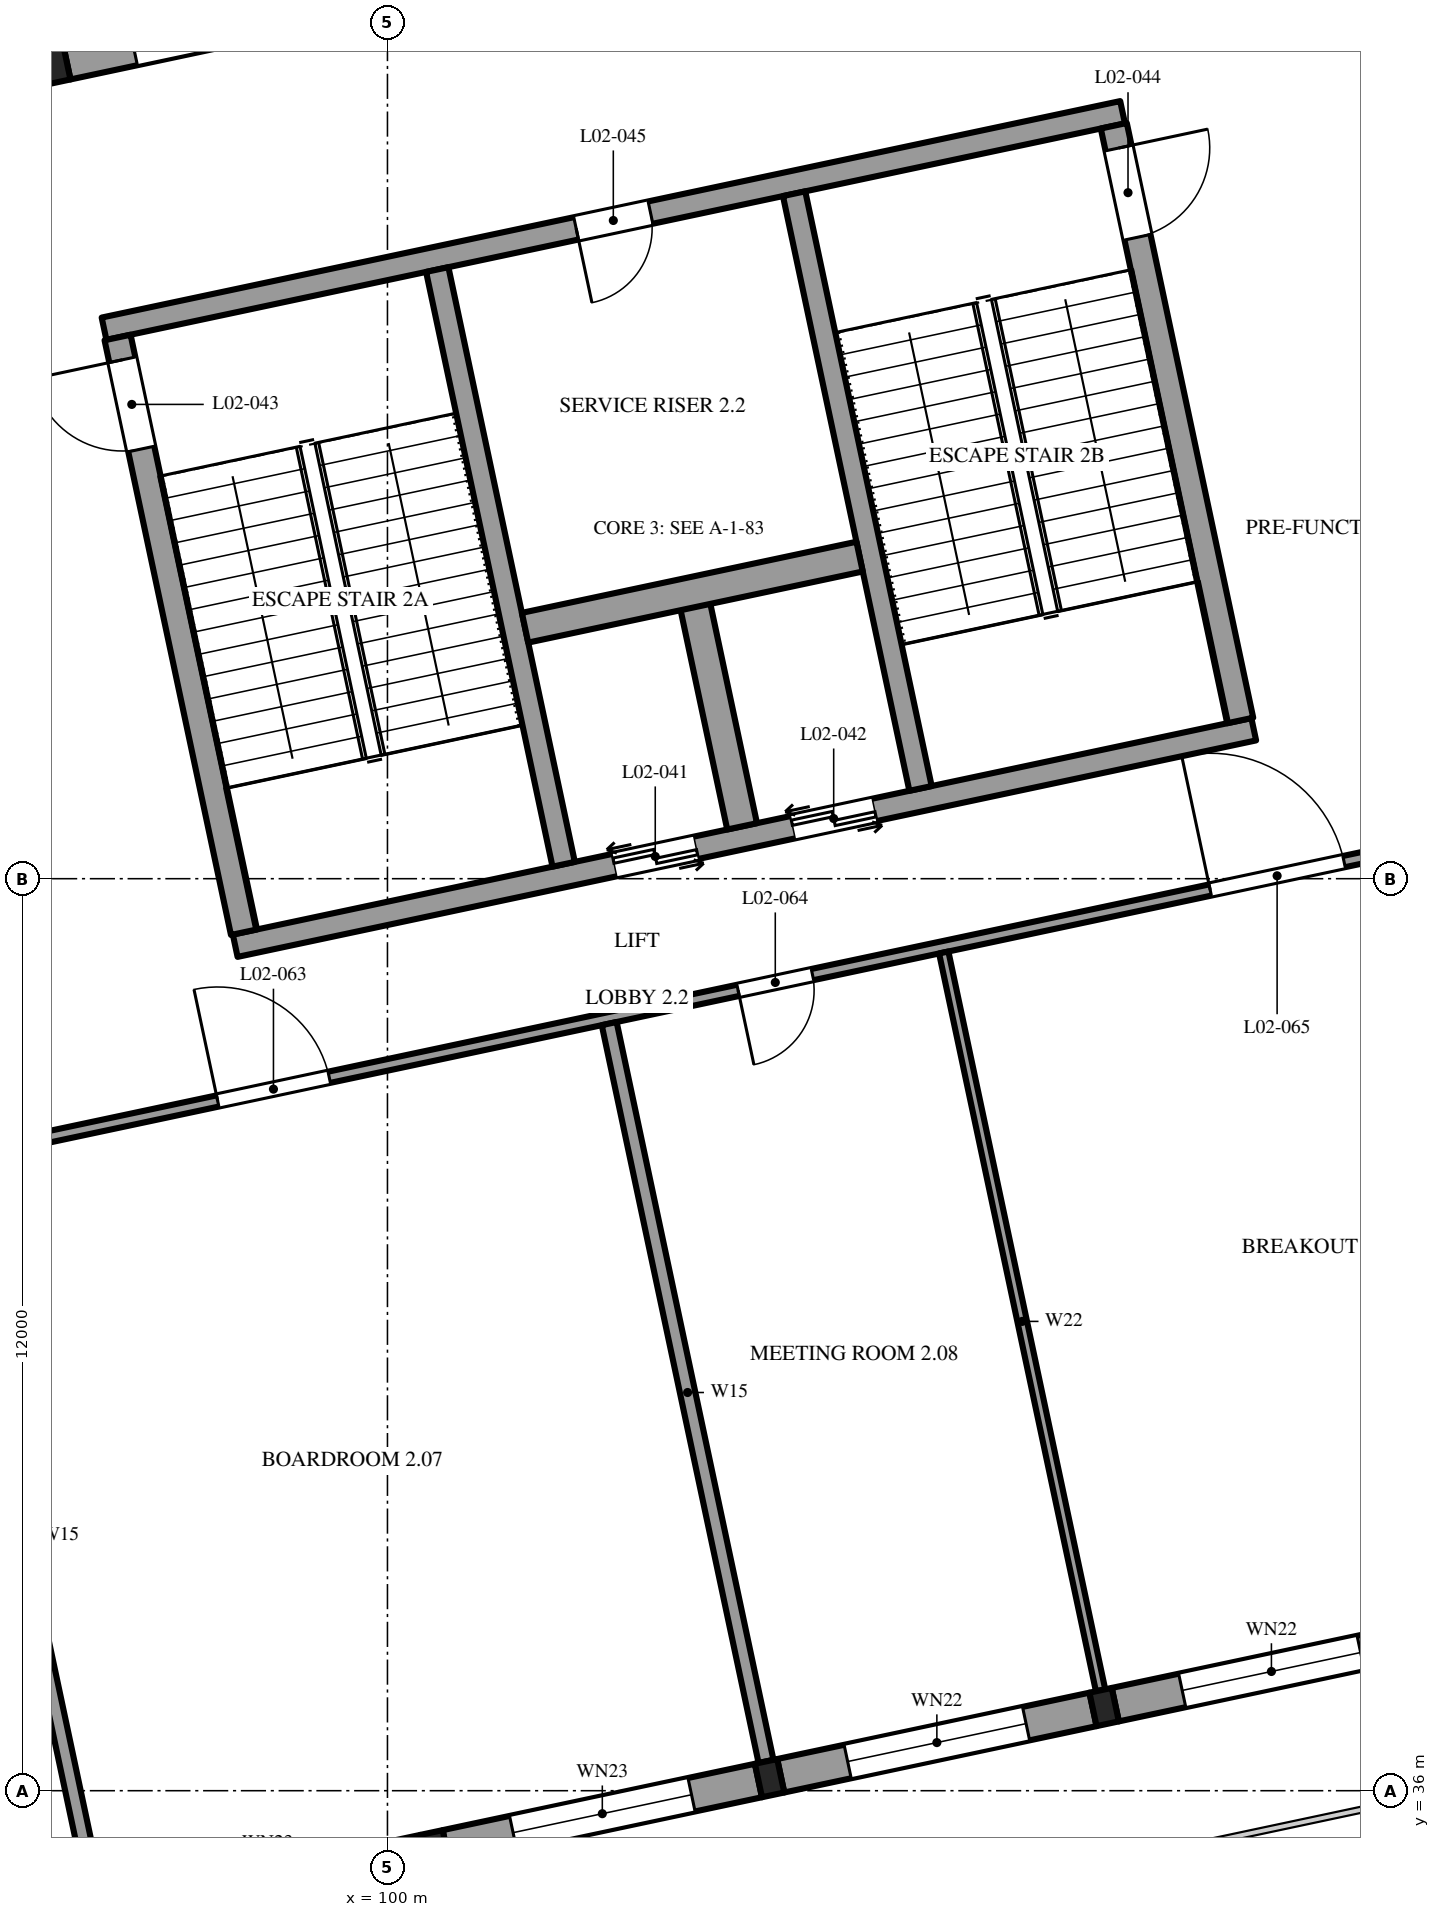
"""IFC4 building model, lengths in metres.
Left out: names, types, materials, properties, quantities, classifications, styles, units other than length and angle.
Written with IfcOpenShell. Run it as: python <this file> out.ifc"""

import sys

from ifc_helpers import new_model, si_unit, direction, frame, frame_2d, origin, origin_2d, place, context, subcontext, project, spatial, rectangle, i_section, extrude, element, fill, save


model = new_model("IFC4")
c1 = context("Model", 3, precision=1e-05, world=origin(), true_north=direction((0.0, 1.0)))
c2 = subcontext(c1, "Body", "Model", "MODEL_VIEW")
j1 = project(units=[si_unit("LENGTHUNIT", "METRE"), si_unit("PLANEANGLEUNIT", "RADIAN")], contexts=[c1])
p1 = place(None, origin())
s1 = spatial("IfcSite", under=j1, at=p1, CompositionType="ELEMENT")
p2 = place(p1, origin())
s2 = spatial("IfcBuilding", under=s1, at=p2, CompositionType="ELEMENT")
p3 = place(p2, frame((0.0, 0.0, 12.0)))
s3 = spatial("IfcBuildingStorey", under=s2, at=p3, CompositionType="ELEMENT", Elevation=12.0)
for number, where, z_axis, x_axis in (
    (1, (100.626, 35.23, 0.0), (0.0, 0.0, 1.0), (0.978, 0.208, 0.0)),
    (2, (105.028, 36.165, 0.0), (0.0, 0.0, 1.0), (0.978, 0.208, 0.0)),
    (3, (109.429, 37.101, 0.0), (0.0, 0.0, 1.0), (0.978, 0.208, 0.0)),
    (4, (95.636, 58.705, 0.0), (0.0, 0.0, 1.0), (0.978, 0.208, 0.0)),
):
    element("IfcColumn", number, at=place(p3, frame(where, z_axis=z_axis, x_axis=x_axis)), inside=s3, PredefinedType="COLUMN", context=c2, shape_type="SweptSolid", body=[
        extrude(i_section(OverallWidth=0.3, OverallDepth=0.45, WebThickness=0.014, FlangeThickness=0.026, FilletRadius=0.027, at=origin_2d()), origin(), (0.0, 0.0, 1.0), 4.8),
    ])
p4 = place(p3, frame((96.271, 55.236, 0.0), z_axis=(0.0, 0.0, 1.0), x_axis=(0.978147662755, 0.20791139903, 0.0)))
e5 = element("IfcWall", 5, at=p4, inside=s3, PredefinedType="SHEAR", context=c2, shape_type="SweptSolid", body=[
    extrude(rectangle(XDim=13.7, YDim=0.3, at=frame_2d((6.85, 0.0))), origin(), (0.0, 0.0, 1.0), 4.8),
])
p5 = place(p4, frame((6.35, 0.0, 0.0)))
e6 = element("IfcOpeningElement", 6, at=p5, cuts=e5, PredefinedType="OPENING", context=c2, shape_type="SweptSolid", body=[
    extrude(rectangle(XDim=1.0, YDim=2.1, at=frame_2d((0.5, 1.05))), frame((0.0, 0.16, 0.0), z_axis=(0.0, -1.0, 0.0), x_axis=(1.0, 0.0, 0.0)), (0.0, 0.0, 1.0), 0.32),
])
p6 = place(p3, frame((97.997, 47.118, 0.0), z_axis=(0.0, 0.0, 1.0), x_axis=(0.978147662755, 0.20791139903, 0.0)))
e7 = element("IfcWall", 7, at=p6, inside=s3, PredefinedType="SHEAR", context=c2, shape_type="SweptSolid", body=[
    extrude(rectangle(XDim=13.7, YDim=0.3, at=frame_2d((6.85, 0.0))), origin(), (0.0, 0.0, 1.0), 4.8),
])
p7 = place(p6, frame((5.1, 0.0, 0.0)))
e8 = element("IfcOpeningElement", 8, at=p7, cuts=e7, PredefinedType="OPENING", context=c2, shape_type="SweptSolid", body=[
    extrude(rectangle(XDim=1.1, YDim=2.1, at=frame_2d((0.55, 1.05))), frame((0.0, 0.16, 0.0), z_axis=(0.0, -1.0, 0.0), x_axis=(1.0, 0.0, 0.0)), (0.0, 0.0, 1.0), 0.32),
])
p8 = place(p6, frame((7.5, 0.0, 0.0)))
e9 = element("IfcOpeningElement", 9, at=p8, cuts=e7, PredefinedType="OPENING", context=c2, shape_type="SweptSolid", body=[
    extrude(rectangle(XDim=1.1, YDim=2.1, at=frame_2d((0.55, 1.05))), frame((0.0, 0.16, 0.0), z_axis=(0.0, -1.0, 0.0), x_axis=(1.0, 0.0, 0.0)), (0.0, 0.0, 1.0), 0.32),
])
p9 = place(p3, frame((96.449, 55.121, 0.0), z_axis=(0.0, 0.0, 1.0), x_axis=(0.207915693476, -0.978146749934, 0.0)))
e10 = element("IfcWall", 10, at=p9, inside=s3, PredefinedType="SOLIDWALL", context=c2, shape_type="SweptSolid", body=[
    extrude(rectangle(XDim=8.0, YDim=0.35, at=frame_2d((4.0, 0.0))), origin(), (0.0, 0.0, 1.0), 4.8),
])
p10 = place(p9, frame((0.3, 0.0, 0.0)))
e11 = element("IfcOpeningElement", 11, at=p10, cuts=e10, PredefinedType="OPENING", context=c2, shape_type="SweptSolid", body=[
    extrude(rectangle(XDim=1.2, YDim=2.1, at=frame_2d((0.6, 1.05))), frame((0.0, 0.185, 0.0), z_axis=(0.0, -1.0, 0.0), x_axis=(1.0, 0.0, 0.0)), (0.0, 0.0, 1.0), 0.37),
])
p11 = place(p3, frame((109.556, 57.907, 0.0), z_axis=(0.0, 0.0, 1.0), x_axis=(0.207915693476, -0.978146749934, 0.0)))
e12 = element("IfcWall", 12, at=p11, inside=s3, PredefinedType="SOLIDWALL", context=c2, shape_type="SweptSolid", body=[
    extrude(rectangle(XDim=8.0, YDim=0.35, at=frame_2d((4.0, 0.0))), origin(), (0.0, 0.0, 1.0), 4.8),
])
p12 = place(p11, frame((0.3, 0.0, 0.0)))
e13 = element("IfcOpeningElement", 13, at=p12, cuts=e12, PredefinedType="OPENING", context=c2, shape_type="SweptSolid", body=[
    extrude(rectangle(XDim=1.2, YDim=2.1, at=frame_2d((0.6, 1.05))), frame((0.0, 0.185, 0.0), z_axis=(0.0, -1.0, 0.0), x_axis=(1.0, 0.0, 0.0)), (0.0, 0.0, 1.0), 0.37),
])
for number, where, z_axis, x_axis in (
    (14, (100.655, 56.015, 0.0), (0.0, 0.0, 1.0), (0.208, -0.978, 0.0)),
    (15, (105.35, 57.013, 0.0), (0.0, 0.0, 1.0), (0.208, -0.978, 0.0)),
):
    element("IfcWall", number, at=place(p3, frame(where, z_axis=z_axis, x_axis=x_axis)), inside=s3, PredefinedType="SHEAR", context=c2, shape_type="SweptSolid", body=[
        extrude(rectangle(XDim=8.0, YDim=0.3, at=frame_2d((4.0, 0.0))), origin(), (0.0, 0.0, 1.0), 4.8),
    ])
p13 = place(p3, frame((104.042, 51.623, 0.0), z_axis=(0.0, 0.0, 1.0), x_axis=(0.207917150959, -0.978146440129, 0.0)))
e16 = element("IfcWall", 16, at=p13, inside=s3, PredefinedType="SHEAR", context=c2, shape_type="SweptSolid", body=[
    extrude(rectangle(XDim=3.0, YDim=0.4, at=frame_2d((1.5, 0.0))), origin(), (0.0, 0.0, 1.0), 4.8),
])
p14 = place(p3, frame((101.81, 51.302, 0.0), z_axis=(0.0, 0.0, 1.0), x_axis=(0.978138577198, 0.207954138688, 0.0)))
e17 = element("IfcWall", 17, at=p14, inside=s3, PredefinedType="SHEAR", context=c2, shape_type="SweptSolid", body=[
    extrude(rectangle(XDim=4.5, YDim=0.4, at=frame_2d((2.25, 0.0))), origin(), (0.0, 0.0, 1.0), 4.8),
])
p15 = place(p3, frame((96.371, 34.325, 0.0), z_axis=(0.0, 0.0, 1.0), x_axis=(0.978143927149, 0.207928972925, 0.0)))
e18 = element("IfcWall", 18, at=p15, inside=s3, PredefinedType="SOLIDWALL", context=c2, shape_type="SweptSolid", body=[
    extrude(rectangle(XDim=4.2, YDim=0.45, at=frame_2d((2.1, 0.0))), origin(), (0.0, 0.0, 1.0), 4.35),
])
p16 = place(p15, frame((0.9, 0.0, 0.6)))
e19 = element("IfcOpeningElement", 19, at=p16, cuts=e18, PredefinedType="OPENING", context=c2, shape_type="SweptSolid", body=[
    extrude(rectangle(XDim=2.4, YDim=2.7, at=frame_2d((1.2, 1.35))), frame((0.0, 0.235, 0.0), z_axis=(0.0, -1.0, 0.0), x_axis=(1.0, 0.0, 0.0)), (0.0, 0.0, 1.0), 0.47),
])
p17 = place(p3, frame((100.773, 35.261, 0.0), z_axis=(0.0, 0.0, 1.0), x_axis=(0.978143927149, 0.207928972925, 0.0)))
e20 = element("IfcWall", 20, at=p17, inside=s3, PredefinedType="SOLIDWALL", context=c2, shape_type="SweptSolid", body=[
    extrude(rectangle(XDim=4.2, YDim=0.45, at=frame_2d((2.1, 0.0))), origin(), (0.0, 0.0, 1.0), 4.35),
])
p18 = place(p17, frame((0.9, 0.0, 0.6)))
e21 = element("IfcOpeningElement", 21, at=p18, cuts=e20, PredefinedType="OPENING", context=c2, shape_type="SweptSolid", body=[
    extrude(rectangle(XDim=2.4, YDim=2.7, at=frame_2d((1.2, 1.35))), frame((0.0, 0.235, 0.0), z_axis=(0.0, -1.0, 0.0), x_axis=(1.0, 0.0, 0.0)), (0.0, 0.0, 1.0), 0.47),
])
p19 = place(p3, frame((105.174, 36.197, 0.0), z_axis=(0.0, 0.0, 1.0), x_axis=(0.978155748334, 0.207873355681, 0.0)))
e22 = element("IfcWall", 22, at=p19, inside=s3, PredefinedType="SOLIDWALL", context=c2, shape_type="SweptSolid", body=[
    extrude(rectangle(XDim=4.2, YDim=0.45, at=frame_2d((2.1, 0.0))), origin(), (0.0, 0.0, 1.0), 4.35),
])
p20 = place(p19, frame((0.9, 0.0, 0.9)))
e23 = element("IfcOpeningElement", 23, at=p20, cuts=e22, PredefinedType="OPENING", context=c2, shape_type="SweptSolid", body=[
    extrude(rectangle(XDim=2.4, YDim=2.4, at=frame_2d((1.2, 1.2))), frame((0.0, 0.235, 0.0), z_axis=(0.0, -1.0, 0.0), x_axis=(1.0, 0.0, 0.0)), (0.0, 0.0, 1.0), 0.47),
])
p21 = place(p3, frame((109.576, 37.132, 0.0), z_axis=(0.0, 0.0, 1.0), x_axis=(0.978146440129, 0.207917150959, 0.0)))
e24 = element("IfcWall", 24, at=p21, inside=s3, PredefinedType="SOLIDWALL", context=c2, shape_type="SweptSolid", body=[
    extrude(rectangle(XDim=4.2, YDim=0.45, at=frame_2d((2.1, 0.0))), origin(), (0.0, 0.0, 1.0), 4.35),
])
p22 = place(p21, frame((0.9, 0.0, 0.9)))
e25 = element("IfcOpeningElement", 25, at=p22, cuts=e24, PredefinedType="OPENING", context=c2, shape_type="SweptSolid", body=[
    extrude(rectangle(XDim=2.4, YDim=2.4, at=frame_2d((1.2, 1.2))), frame((0.0, 0.235, 0.0), z_axis=(0.0, -1.0, 0.0), x_axis=(1.0, 0.0, 0.0)), (0.0, 0.0, 1.0), 0.47),
])
p23 = place(p3, frame((95.783, 58.736, 0.0), z_axis=(0.0, 0.0, 1.0), x_axis=(0.978146440129, 0.207917150959, 0.0)))
e26 = element("IfcWall", 26, at=p23, inside=s3, PredefinedType="SOLIDWALL", context=c2, shape_type="SweptSolid", body=[
    extrude(rectangle(XDim=4.2, YDim=0.45, at=frame_2d((2.1, 0.0))), origin(), (0.0, 0.0, 1.0), 4.35),
])
p24 = place(p23, frame((0.9, 0.0, 0.45)))
e27 = element("IfcOpeningElement", 27, at=p24, cuts=e26, PredefinedType="OPENING", context=c2, shape_type="SweptSolid", body=[
    extrude(rectangle(XDim=2.4, YDim=3.3, at=frame_2d((1.2, 1.65))), frame((0.0, 0.235, 0.0), z_axis=(0.0, -1.0, 0.0), x_axis=(1.0, 0.0, 0.0)), (0.0, 0.0, 1.0), 0.47),
])
p25 = place(p3, frame((80.893, 41.489, 0.0), z_axis=(0.0, 0.0, 1.0), x_axis=(0.978147680869, 0.207911313813, 0.0)))
e28 = element("IfcWall", 28, at=p25, inside=s3, PredefinedType="PARTITIONING", context=c2, shape_type="SweptSolid", body=[
    extrude(rectangle(XDim=40.5, YDim=0.15, at=frame_2d((20.25, 0.0))), origin(), (0.0, 0.0, 1.0), 3.75),
])
p26 = place(p25, frame((1.75, 0.0, 0.0)))
e29 = element("IfcOpeningElement", 29, at=p26, cuts=e28, PredefinedType="OPENING", context=c2, shape_type="SweptSolid", body=[
    extrude(rectangle(XDim=1.0, YDim=2.1, at=frame_2d((0.5, 1.05))), frame((0.0, 0.085, 0.0), z_axis=(0.0, -1.0, 0.0), x_axis=(1.0, 0.0, 0.0)), (0.0, 0.0, 1.0), 0.17),
])
p27 = place(p25, frame((8.1, 0.0, 0.0)))
e30 = element("IfcOpeningElement", 30, at=p27, cuts=e28, PredefinedType="OPENING", context=c2, shape_type="SweptSolid", body=[
    extrude(rectangle(XDim=1.8, YDim=2.1, at=frame_2d((0.9, 1.05))), frame((0.0, 0.085, 0.0), z_axis=(0.0, -1.0, 0.0), x_axis=(1.0, 0.0, 0.0)), (0.0, 0.0, 1.0), 0.17),
])
p28 = place(p25, frame((17.25, 0.0, 0.0)))
e31 = element("IfcOpeningElement", 31, at=p28, cuts=e28, PredefinedType="OPENING", context=c2, shape_type="SweptSolid", body=[
    extrude(rectangle(XDim=1.5, YDim=2.1, at=frame_2d((0.75, 1.05))), frame((0.0, 0.085, 0.0), z_axis=(0.0, -1.0, 0.0), x_axis=(1.0, 0.0, 0.0)), (0.0, 0.0, 1.0), 0.17),
])
p29 = place(p25, frame((24.25, 0.0, 0.0)))
e32 = element("IfcOpeningElement", 32, at=p29, cuts=e28, PredefinedType="OPENING", context=c2, shape_type="SweptSolid", body=[
    extrude(rectangle(XDim=1.0, YDim=2.1, at=frame_2d((0.5, 1.05))), frame((0.0, 0.085, 0.0), z_axis=(0.0, -1.0, 0.0), x_axis=(1.0, 0.0, 0.0)), (0.0, 0.0, 1.0), 0.17),
])
p30 = place(p25, frame((30.6, 0.0, 0.0)))
e33 = element("IfcOpeningElement", 33, at=p30, cuts=e28, PredefinedType="OPENING", context=c2, shape_type="SweptSolid", body=[
    extrude(rectangle(XDim=1.8, YDim=2.1, at=frame_2d((0.9, 1.05))), frame((0.0, 0.085, 0.0), z_axis=(0.0, -1.0, 0.0), x_axis=(1.0, 0.0, 0.0)), (0.0, 0.0, 1.0), 0.17),
])
p31 = place(p25, frame((37.75, 0.0, 0.0)))
e34 = element("IfcOpeningElement", 34, at=p31, cuts=e28, PredefinedType="OPENING", context=c2, shape_type="SweptSolid", body=[
    extrude(rectangle(XDim=1.0, YDim=2.1, at=frame_2d((0.5, 1.05))), frame((0.0, 0.085, 0.0), z_axis=(0.0, -1.0, 0.0), x_axis=(1.0, 0.0, 0.0)), (0.0, 0.0, 1.0), 0.17),
])
p32 = place(p3, frame((96.177, 34.514, 0.0), z_axis=(0.0, 0.0, 1.0), x_axis=(-0.20790935802, 0.978148096582, 0.0)))
e35 = element("IfcWall", 35, at=p32, inside=s3, PredefinedType="PARTITIONING", context=c2, shape_type="SweptSolid", body=[
    extrude(rectangle(XDim=9.925, YDim=0.2, at=frame_2d((4.962, 0.0))), origin(), (0.0, 0.0, 1.0), 3.75),
])
p33 = place(p3, frame((104.981, 36.385, 0.0), z_axis=(0.0, 0.0, 1.0), x_axis=(-0.207927890391, 0.978144157268, 0.0)))
e36 = element("IfcWall", 36, at=p33, inside=s3, PredefinedType="PARTITIONING", context=c2, shape_type="SweptSolid", body=[
    extrude(rectangle(XDim=9.925, YDim=0.2, at=frame_2d((4.963, 0.0))), origin(), (0.0, 0.0, 1.0), 3.75),
])
p34 = place(p3, frame((109.383, 37.321, 0.0), z_axis=(0.0, 0.0, 1.0), x_axis=(-0.20790935802, 0.978148096582, 0.0)))
e37 = element("IfcWall", 37, at=p34, inside=s3, PredefinedType="PARTITIONING", context=c2, shape_type="SweptSolid", body=[
    extrude(rectangle(XDim=9.925, YDim=0.125, at=frame_2d((4.962, 0.0))), origin(), (0.0, 0.0, 1.0), 3.75),
])
p35 = place(p18, origin())
e38 = element("IfcWindow", 38, at=p35, inside=s3, PartitioningType="SINGLE_PANEL", PredefinedType="WINDOW", context=c2, shape_type="SweptSolid", body=[
    extrude(rectangle(XDim=2.4, YDim=2.7, at=frame_2d((1.2, 1.35))), frame((0.0, 0.03, 0.0), z_axis=(0.0, -1.0, 0.0), x_axis=(1.0, 0.0, 0.0)), (0.0, 0.0, 1.0), 0.06),
])
fill(e21, e38)
p36 = place(p20, origin())
e39 = element("IfcWindow", 39, at=p36, inside=s3, PartitioningType="SINGLE_PANEL", PredefinedType="WINDOW", context=c2, shape_type="SweptSolid", body=[
    extrude(rectangle(XDim=2.4, YDim=2.4, at=frame_2d((1.2, 1.2))), frame((0.0, 0.03, 0.0), z_axis=(0.0, -1.0, 0.0), x_axis=(1.0, 0.0, 0.0)), (0.0, 0.0, 1.0), 0.06),
])
fill(e23, e39)
p37 = place(p22, origin())
e40 = element("IfcWindow", 40, at=p37, inside=s3, PartitioningType="SINGLE_PANEL", PredefinedType="WINDOW", context=c2, shape_type="SweptSolid", body=[
    extrude(rectangle(XDim=2.4, YDim=2.4, at=frame_2d((1.2, 1.2))), frame((0.0, 0.03, 0.0), z_axis=(0.0, -1.0, 0.0), x_axis=(1.0, 0.0, 0.0)), (0.0, 0.0, 1.0), 0.06),
])
fill(e25, e40)
p38 = place(p7, frame((1.1, 0.0, 0.0), z_axis=(0.0, 0.0, 1.0), x_axis=(-1.0, 0.0, 0.0)))
e41 = element("IfcDoor", 41, at=p38, inside=s3, OperationType="DOUBLE_DOOR_SLIDING", PredefinedType="DOOR", context=c2, shape_type="SweptSolid", body=[
    extrude(rectangle(XDim=1.1, YDim=2.1, at=frame_2d((0.55, 1.05))), frame((0.0, 0.025, 0.0), z_axis=(0.0, -1.0, 0.0), x_axis=(1.0, 0.0, 0.0)), (0.0, 0.0, 1.0), 0.05),
])
fill(e8, e41)
p39 = place(p8, frame((1.1, 0.0, 0.0), z_axis=(0.0, 0.0, 1.0), x_axis=(-1.0, 0.0, 0.0)))
e42 = element("IfcDoor", 42, at=p39, inside=s3, OperationType="DOUBLE_DOOR_SLIDING", PredefinedType="DOOR", context=c2, shape_type="SweptSolid", body=[
    extrude(rectangle(XDim=1.1, YDim=2.1, at=frame_2d((0.55, 1.05))), frame((0.0, 0.025, 0.0), z_axis=(0.0, -1.0, 0.0), x_axis=(1.0, 0.0, 0.0)), (0.0, 0.0, 1.0), 0.05),
])
fill(e9, e42)
p40 = place(p10, frame((1.2, 0.0, 0.0), z_axis=(0.0, 0.0, 1.0), x_axis=(-1.0, 0.0, 0.0)))
e43 = element("IfcDoor", 43, at=p40, inside=s3, OperationType="SINGLE_SWING_RIGHT", PredefinedType="DOOR", context=c2, shape_type="SweptSolid", body=[
    extrude(rectangle(XDim=1.2, YDim=2.1, at=frame_2d((0.6, 1.05))), frame((0.0, 0.025, 0.0), z_axis=(0.0, -1.0, 0.0), x_axis=(1.0, 0.0, 0.0)), (0.0, 0.0, 1.0), 0.05),
])
fill(e11, e43)
p41 = place(p12, origin())
e44 = element("IfcDoor", 44, at=p41, inside=s3, OperationType="SINGLE_SWING_RIGHT", PredefinedType="DOOR", context=c2, shape_type="SweptSolid", body=[
    extrude(rectangle(XDim=1.2, YDim=2.1, at=frame_2d((0.6, 1.05))), frame((0.0, 0.025, 0.0), z_axis=(0.0, -1.0, 0.0), x_axis=(1.0, 0.0, 0.0)), (0.0, 0.0, 1.0), 0.05),
])
fill(e13, e44)
p42 = place(p5, frame((1.0, 0.0, 0.0), z_axis=(0.0, 0.0, 1.0), x_axis=(-1.0, 0.0, 0.0)))
e45 = element("IfcDoor", 45, at=p42, inside=s3, OperationType="SINGLE_SWING_LEFT", PredefinedType="DOOR", context=c2, shape_type="SweptSolid", body=[
    extrude(rectangle(XDim=1.0, YDim=2.1, at=frame_2d((0.5, 1.05))), frame((0.0, 0.025, 0.0), z_axis=(0.0, -1.0, 0.0), x_axis=(1.0, 0.0, 0.0)), (0.0, 0.0, 1.0), 0.05),
])
fill(e6, e45)
p43 = place(p28, origin())
e46 = element("IfcDoor", 46, at=p43, inside=s3, OperationType="DOUBLE_DOOR_SINGLE_SWING", PredefinedType="DOOR", context=c2, shape_type="SweptSolid", body=[
    extrude(rectangle(XDim=1.5, YDim=2.1, at=frame_2d((0.75, 1.05))), frame((0.0, 0.025, 0.0), z_axis=(0.0, -1.0, 0.0), x_axis=(1.0, 0.0, 0.0)), (0.0, 0.0, 1.0), 0.05),
])
fill(e31, e46)
p44 = place(p29, frame((1.0, 0.0, 0.0), z_axis=(0.0, 0.0, 1.0), x_axis=(-1.0, 0.0, 0.0)))
e47 = element("IfcDoor", 47, at=p44, inside=s3, OperationType="SINGLE_SWING_RIGHT", PredefinedType="DOOR", context=c2, shape_type="SweptSolid", body=[
    extrude(rectangle(XDim=1.0, YDim=2.1, at=frame_2d((0.5, 1.05))), frame((0.0, 0.025, 0.0), z_axis=(0.0, -1.0, 0.0), x_axis=(1.0, 0.0, 0.0)), (0.0, 0.0, 1.0), 0.05),
])
fill(e32, e47)
p45 = place(p30, origin())
e48 = element("IfcDoor", 48, at=p45, inside=s3, OperationType="DOUBLE_DOOR_SINGLE_SWING", PredefinedType="DOOR", context=c2, shape_type="SweptSolid", body=[
    extrude(rectangle(XDim=1.8, YDim=2.1, at=frame_2d((0.9, 1.05))), frame((0.0, 0.025, 0.0), z_axis=(0.0, -1.0, 0.0), x_axis=(1.0, 0.0, 0.0)), (0.0, 0.0, 1.0), 0.05),
])
fill(e33, e48)
save(model, sys.argv[1])
